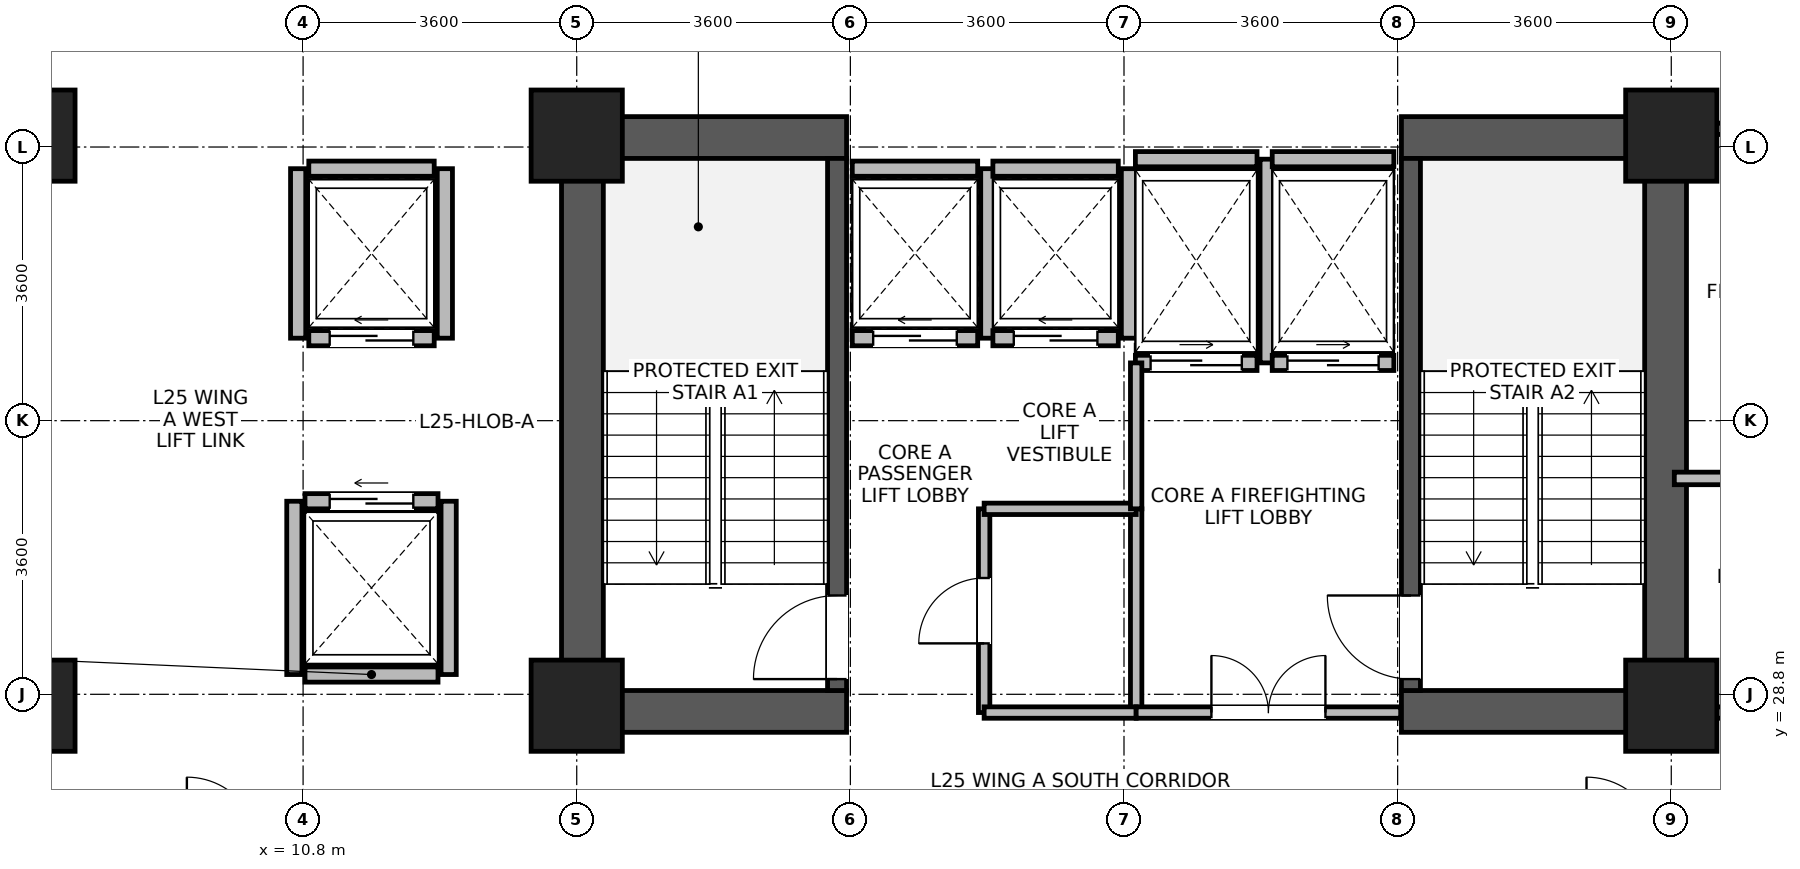
"""IFC4 building model, lengths in metres.
Left out: names, types, materials, properties, quantities, classifications, styles, units other than length and angle.
Written with IfcOpenShell. Run it as: python <this file> out.ifc"""

import sys

from ifc_helpers import new_model, si_unit, direction, frame, frame_2d, origin, origin_2d, place, context, subcontext, project, spatial, rectangle, extrude, source, transform, mapped, element, fill, save


model = new_model("IFC4")
c1 = context("Model", 3, precision=1e-05, world=origin(), true_north=direction((0.0, 1.0)))
c2 = subcontext(c1, "Body", "Model", "MODEL_VIEW")
j1 = project(units=[si_unit("LENGTHUNIT", "METRE"), si_unit("PLANEANGLEUNIT", "RADIAN")], contexts=[c1])
p1 = place(None, origin())
s1 = spatial("IfcSite", under=j1, at=p1, CompositionType="ELEMENT")
p2 = place(p1, origin())
s2 = spatial("IfcBuilding", under=s1, at=p2, CompositionType="ELEMENT")
p3 = place(p2, frame((0.0, 0.0, 100.8)))
s3 = spatial("IfcBuildingStorey", under=s2, at=p3, CompositionType="ELEMENT", Elevation=100.8)
for number, where, z_axis, x_axis in (
    (1, (14.475, 28.3, 0.0), (0.0, 0.0, 1.0), (0.0, 1.0, 0.0)),
    (2, (28.725, 28.3, 0.0), (0.0, 0.0, 1.0), (0.0, 1.0, 0.0)),
):
    element("IfcWall", number, at=place(p3, frame(where, z_axis=z_axis, x_axis=x_axis)), inside=s3, PredefinedType="SHEAR", context=c2, shape_type="SweptSolid", body=[
        extrude(rectangle(XDim=8.1, YDim=0.55, at=frame_2d((4.05, 0.0))), origin(), (0.0, 0.0, 1.0), 3.45),
    ])
for number, where, z_axis, x_axis in (
    (3, (14.75, 28.575, 0.0), (0.0, 0.0, 1.0), (1.0, 0.0, 0.0)),
    (4, (25.25, 28.575, 0.0), (0.0, 0.0, 1.0), (1.0, 0.0, 0.0)),
    (5, (14.75, 36.125, 0.0), (0.0, 0.0, 1.0), (1.0, 0.0, 0.0)),
    (6, (25.25, 36.125, 0.0), (0.0, 0.0, 1.0), (1.0, 0.0, 0.0)),
):
    element("IfcWall", number, at=place(p3, frame(where, z_axis=z_axis, x_axis=x_axis)), inside=s3, PredefinedType="SHEAR", context=c2, shape_type="SweptSolid", body=[
        extrude(rectangle(XDim=3.2, YDim=0.55, at=frame_2d((1.6, 0.0))), origin(), (0.0, 0.0, 1.0), 3.45),
    ])
p4 = place(p3, frame((17.825, 28.85, 0.0), z_axis=(0.0, 0.0, 1.0), x_axis=(0.0, 1.0, 0.0)))
e7 = element("IfcWall", 7, at=p4, inside=s3, PredefinedType="SHEAR", context=c2, shape_type="SweptSolid", body=[
    extrude(rectangle(XDim=7.0, YDim=0.25, at=frame_2d((3.5, 0.0))), origin(), (0.0, 0.0, 1.0), 3.45),
])
p5 = place(p4, frame((0.15, 0.0, 0.0)))
e8 = element("IfcOpeningElement", 8, at=p5, cuts=e7, PredefinedType="OPENING", context=c2, shape_type="SweptSolid", body=[
    extrude(rectangle(XDim=1.1, YDim=2.08, at=frame_2d((0.55, 1.04))), frame((0.0, 0.135, 0.0), z_axis=(0.0, -1.0, 0.0), x_axis=(1.0, 0.0, 0.0)), (0.0, 0.0, 1.0), 0.27),
])
p6 = place(p3, frame((25.375, 28.85, 0.0), z_axis=(0.0, 0.0, 1.0), x_axis=(0.0, 1.0, 0.0)))
e9 = element("IfcWall", 9, at=p6, inside=s3, PredefinedType="SHEAR", context=c2, shape_type="SweptSolid", body=[
    extrude(rectangle(XDim=7.0, YDim=0.25, at=frame_2d((3.5, 0.0))), origin(), (0.0, 0.0, 1.0), 3.45),
])
p7 = place(p6, frame((0.15, 0.0, 0.0)))
e10 = element("IfcOpeningElement", 10, at=p7, cuts=e9, PredefinedType="OPENING", context=c2, shape_type="SweptSolid", body=[
    extrude(rectangle(XDim=1.1, YDim=2.08, at=frame_2d((0.55, 1.04))), frame((0.0, 0.135, 0.0), z_axis=(0.0, -1.0, 0.0), x_axis=(1.0, 0.0, 0.0)), (0.0, 0.0, 1.0), 0.27),
])
m1 = source(origin(), c2, "Body", "SweptSolid", [
    extrude(rectangle(XDim=1.2, YDim=1.2, at=origin_2d()), origin(), (0.0, 0.0, 1.0), 3.7),
])
for number, where, z_axis, x_axis in (
    (11, (7.2, 28.65, 0.0), (0.0, 0.0, 1.0), (1.0, 0.0, 0.0)),
    (12, (7.2, 36.15, 0.0), (0.0, 0.0, 1.0), (1.0, 0.0, 0.0)),
    (13, (14.4, 28.65, 0.0), (0.0, 0.0, 1.0), (1.0, 0.0, 0.0)),
    (14, (14.4, 36.15, 0.0), (0.0, 0.0, 1.0), (1.0, 0.0, 0.0)),
    (15, (28.8, 28.65, 0.0), (0.0, 0.0, 1.0), (1.0, 0.0, 0.0)),
    (16, (28.8, 36.15, 0.0), (0.0, 0.0, 1.0), (1.0, 0.0, 0.0)),
):
    element("IfcColumn", number, at=place(p3, frame(where, z_axis=z_axis, x_axis=x_axis)), inside=s3, PredefinedType="COLUMN", context=c2, shape_type="MappedRepresentation", body=[
        mapped(m1, transform((0.0, 0.0, 0.0), x_axis=(1.0, 0.0, 0.0), y_axis=(0.0, 1.0, 0.0), z_axis=(0.0, 0.0, 1.0), scale=1.0)),
    ])
p8 = place(p3, frame((18.025, 33.485, 0.0), z_axis=(0.0, 0.0, 1.0), x_axis=(1.0, 0.0, 0.0)))
e17 = element("IfcWall", 17, at=p8, inside=s3, PredefinedType="PARTITIONING", context=c2, shape_type="SweptSolid", body=[
    extrude(rectangle(XDim=1.65, YDim=0.2, at=frame_2d((0.825, 0.0))), origin(), (0.0, 0.0, 1.0), 3.43),
])
p9 = place(p8, frame((0.275, 0.0, 0.0)))
e18 = element("IfcOpeningElement", 18, at=p9, cuts=e17, PredefinedType="OPENING", context=c2, shape_type="SweptSolid", body=[
    extrude(rectangle(XDim=1.1, YDim=2.12, at=frame_2d((0.55, 1.06))), frame((0.0, 0.11, 0.0), z_axis=(0.0, -1.0, 0.0), x_axis=(1.0, 0.0, 0.0)), (0.0, 0.0, 1.0), 0.22),
])
p10 = place(p3, frame((18.025, 35.715, 0.0), z_axis=(0.0, 0.0, 1.0), x_axis=(1.0, 0.0, 0.0)))
e19 = element("IfcWall", 19, at=p10, inside=s3, PredefinedType="PARTITIONING", context=c2, shape_type="SweptSolid", body=[
    extrude(rectangle(XDim=1.65, YDim=0.2, at=frame_2d((0.825, 0.0))), origin(), (0.0, 0.0, 1.0), 3.43),
])
p11 = place(p3, frame((19.815, 33.485, 0.0), z_axis=(0.0, 0.0, 1.0), x_axis=(0.0, 1.0, 0.0)))
e20 = element("IfcWall", 20, at=p11, inside=s3, PredefinedType="PARTITIONING", context=c2, shape_type="SweptSolid", body=[
    extrude(rectangle(XDim=2.23, YDim=0.2, at=frame_2d((1.115, 0.0))), origin(), (0.0, 0.0, 1.0), 3.43),
])
p12 = place(p3, frame((19.875, 33.485, 0.0), z_axis=(0.0, 0.0, 1.0), x_axis=(1.0, 0.0, 0.0)))
e21 = element("IfcWall", 21, at=p12, inside=s3, PredefinedType="PARTITIONING", context=c2, shape_type="SweptSolid", body=[
    extrude(rectangle(XDim=1.65, YDim=0.2, at=frame_2d((0.825, 0.0))), origin(), (0.0, 0.0, 1.0), 3.43),
])
p13 = place(p12, frame((0.275, 0.0, 0.0)))
e22 = element("IfcOpeningElement", 22, at=p13, cuts=e21, PredefinedType="OPENING", context=c2, shape_type="SweptSolid", body=[
    extrude(rectangle(XDim=1.1, YDim=2.12, at=frame_2d((0.55, 1.06))), frame((0.0, 0.11, 0.0), z_axis=(0.0, -1.0, 0.0), x_axis=(1.0, 0.0, 0.0)), (0.0, 0.0, 1.0), 0.22),
])
p14 = place(p3, frame((19.875, 35.715, 0.0), z_axis=(0.0, 0.0, 1.0), x_axis=(1.0, 0.0, 0.0)))
e23 = element("IfcWall", 23, at=p14, inside=s3, PredefinedType="PARTITIONING", context=c2, shape_type="SweptSolid", body=[
    extrude(rectangle(XDim=1.65, YDim=0.2, at=frame_2d((0.825, 0.0))), origin(), (0.0, 0.0, 1.0), 3.43),
])
p15 = place(p3, frame((21.665, 33.485, 0.0), z_axis=(0.0, 0.0, 1.0), x_axis=(0.0, 1.0, 0.0)))
e24 = element("IfcWall", 24, at=p15, inside=s3, PredefinedType="PARTITIONING", context=c2, shape_type="SweptSolid", body=[
    extrude(rectangle(XDim=2.23, YDim=0.2, at=frame_2d((1.115, 0.0))), origin(), (0.0, 0.0, 1.0), 3.43),
])
p16 = place(p3, frame((10.825, 29.06, 0.0), z_axis=(0.0, 0.0, 1.0), x_axis=(1.0, 0.0, 0.0)))
e25 = element("IfcWall", 25, at=p16, inside=s3, PredefinedType="PARTITIONING", context=c2, shape_type="SweptSolid", body=[
    extrude(rectangle(XDim=1.75, YDim=0.2, at=frame_2d((0.875, 0.0))), origin(), (0.0, 0.0, 1.0), 3.43),
])
p17 = place(p3, frame((10.825, 31.34, 0.0), z_axis=(0.0, 0.0, 1.0), x_axis=(1.0, 0.0, 0.0)))
e26 = element("IfcWall", 26, at=p17, inside=s3, PredefinedType="PARTITIONING", context=c2, shape_type="SweptSolid", body=[
    extrude(rectangle(XDim=1.75, YDim=0.2, at=frame_2d((0.875, 0.0))), origin(), (0.0, 0.0, 1.0), 3.43),
])
p18 = place(p17, frame((0.325, 0.0, 0.0)))
e27 = element("IfcOpeningElement", 27, at=p18, cuts=e26, PredefinedType="OPENING", context=c2, shape_type="SweptSolid", body=[
    extrude(rectangle(XDim=1.1, YDim=2.12, at=frame_2d((0.55, 1.06))), frame((0.0, 0.11, 0.0), z_axis=(0.0, -1.0, 0.0), x_axis=(1.0, 0.0, 0.0)), (0.0, 0.0, 1.0), 0.22),
])
for number, where, z_axis, x_axis in (
    (28, (10.685, 29.06, 0.0), (0.0, 0.0, 1.0), (0.0, 1.0, 0.0)),
    (29, (12.715, 29.06, 0.0), (0.0, 0.0, 1.0), (0.0, 1.0, 0.0)),
):
    element("IfcWall", number, at=place(p3, frame(where, z_axis=z_axis, x_axis=x_axis)), inside=s3, PredefinedType="PARTITIONING", context=c2, shape_type="SweptSolid", body=[
        extrude(rectangle(XDim=2.28, YDim=0.2, at=frame_2d((1.14, 0.0))), origin(), (0.0, 0.0, 1.0), 3.43),
    ])
p19 = place(p3, frame((10.875, 33.485, 0.0), z_axis=(0.0, 0.0, 1.0), x_axis=(1.0, 0.0, 0.0)))
e30 = element("IfcWall", 30, at=p19, inside=s3, PredefinedType="PARTITIONING", context=c2, shape_type="SweptSolid", body=[
    extrude(rectangle(XDim=1.65, YDim=0.2, at=frame_2d((0.825, 0.0))), origin(), (0.0, 0.0, 1.0), 3.43),
])
p20 = place(p19, frame((0.275, 0.0, 0.0)))
e31 = element("IfcOpeningElement", 31, at=p20, cuts=e30, PredefinedType="OPENING", context=c2, shape_type="SweptSolid", body=[
    extrude(rectangle(XDim=1.1, YDim=2.12, at=frame_2d((0.55, 1.06))), frame((0.0, 0.11, 0.0), z_axis=(0.0, -1.0, 0.0), x_axis=(1.0, 0.0, 0.0)), (0.0, 0.0, 1.0), 0.22),
])
p21 = place(p3, frame((10.875, 35.715, 0.0), z_axis=(0.0, 0.0, 1.0), x_axis=(1.0, 0.0, 0.0)))
e32 = element("IfcWall", 32, at=p21, inside=s3, PredefinedType="PARTITIONING", context=c2, shape_type="SweptSolid", body=[
    extrude(rectangle(XDim=1.65, YDim=0.2, at=frame_2d((0.825, 0.0))), origin(), (0.0, 0.0, 1.0), 3.43),
])
for number, where, z_axis, x_axis in (
    (33, (10.735, 33.485, 0.0), (0.0, 0.0, 1.0), (0.0, 1.0, 0.0)),
    (34, (12.665, 33.485, 0.0), (0.0, 0.0, 1.0), (0.0, 1.0, 0.0)),
):
    element("IfcWall", number, at=place(p3, frame(where, z_axis=z_axis, x_axis=x_axis)), inside=s3, PredefinedType="PARTITIONING", context=c2, shape_type="SweptSolid", body=[
        extrude(rectangle(XDim=2.23, YDim=0.2, at=frame_2d((1.115, 0.0))), origin(), (0.0, 0.0, 1.0), 3.43),
    ])
p22 = place(p3, frame((21.75, 33.16, 0.0), z_axis=(0.0, 0.0, 1.0), x_axis=(1.0, 0.0, 0.0)))
e35 = element("IfcWall", 35, at=p22, inside=s3, PredefinedType="PARTITIONING", context=c2, shape_type="SweptSolid", body=[
    extrude(rectangle(XDim=1.6, YDim=0.2, at=frame_2d((0.8, 0.0))), origin(), (0.0, 0.0, 1.0), 3.43),
])
p23 = place(p22, frame((0.2, 0.0, 0.0)))
e36 = element("IfcOpeningElement", 36, at=p23, cuts=e35, PredefinedType="OPENING", context=c2, shape_type="SweptSolid", body=[
    extrude(rectangle(XDim=1.2, YDim=2.12, at=frame_2d((0.6, 1.06))), frame((0.0, 0.11, 0.0), z_axis=(0.0, -1.0, 0.0), x_axis=(1.0, 0.0, 0.0)), (0.0, 0.0, 1.0), 0.22),
])
p24 = place(p3, frame((21.75, 35.84, 0.0), z_axis=(0.0, 0.0, 1.0), x_axis=(1.0, 0.0, 0.0)))
e37 = element("IfcWall", 37, at=p24, inside=s3, PredefinedType="PARTITIONING", context=c2, shape_type="SweptSolid", body=[
    extrude(rectangle(XDim=1.6, YDim=0.2, at=frame_2d((0.8, 0.0))), origin(), (0.0, 0.0, 1.0), 2.43),
])
p25 = place(p3, frame((23.49, 33.16, 0.0), z_axis=(0.0, 0.0, 1.0), x_axis=(0.0, 1.0, 0.0)))
e38 = element("IfcWall", 38, at=p25, inside=s3, PredefinedType="PARTITIONING", context=c2, shape_type="SweptSolid", body=[
    extrude(rectangle(XDim=2.68, YDim=0.2, at=frame_2d((1.34, 0.0))), origin(), (0.0, 0.0, 1.0), 3.43),
])
p26 = place(p3, frame((23.55, 33.16, 0.0), z_axis=(0.0, 0.0, 1.0), x_axis=(1.0, 0.0, 0.0)))
e39 = element("IfcWall", 39, at=p26, inside=s3, PredefinedType="PARTITIONING", context=c2, shape_type="SweptSolid", body=[
    extrude(rectangle(XDim=1.6, YDim=0.2, at=frame_2d((0.8, 0.0))), origin(), (0.0, 0.0, 1.0), 3.43),
])
p27 = place(p26, frame((0.2, 0.0, 0.0)))
e40 = element("IfcOpeningElement", 40, at=p27, cuts=e39, PredefinedType="OPENING", context=c2, shape_type="SweptSolid", body=[
    extrude(rectangle(XDim=1.2, YDim=2.12, at=frame_2d((0.6, 1.06))), frame((0.0, 0.11, 0.0), z_axis=(0.0, -1.0, 0.0), x_axis=(1.0, 0.0, 0.0)), (0.0, 0.0, 1.0), 0.22),
])
p28 = place(p3, frame((23.55, 35.84, 0.0), z_axis=(0.0, 0.0, 1.0), x_axis=(1.0, 0.0, 0.0)))
e41 = element("IfcWall", 41, at=p28, inside=s3, PredefinedType="PARTITIONING", context=c2, shape_type="SweptSolid", body=[
    extrude(rectangle(XDim=1.6, YDim=0.2, at=frame_2d((0.8, 0.0))), origin(), (0.0, 0.0, 1.0), 2.43),
])
p29 = place(p3, frame((29.4, 28.56, 0.0), z_axis=(0.0, 0.0, 1.0), x_axis=(1.0, 0.0, 0.0)))
e42 = element("IfcWall", 42, at=p29, inside=s3, PredefinedType="PARTITIONING", context=c2, shape_type="SweptSolid", body=[
    extrude(rectangle(XDim=3.96, YDim=0.15, at=frame_2d((1.98, 0.0))), origin(), (0.0, 0.0, 1.0), 2.78),
])
p30 = place(p29, frame((1.55, 0.0, 0.0)))
e43 = element("IfcOpeningElement", 43, at=p30, cuts=e42, PredefinedType="OPENING", context=c2, shape_type="SweptSolid", body=[
    extrude(rectangle(XDim=0.86, YDim=2.02, at=frame_2d((0.43, 1.01))), frame((0.0, 0.085, 0.0), z_axis=(0.0, -1.0, 0.0), x_axis=(1.0, 0.0, 0.0)), (0.0, 0.0, 1.0), 0.17),
])
p31 = place(p3, frame((29.4, 36.24, 0.0), z_axis=(0.0, 0.0, 1.0), x_axis=(1.0, 0.0, 0.0)))
e44 = element("IfcWall", 44, at=p31, inside=s3, PredefinedType="PARTITIONING", context=c2, shape_type="SweptSolid", body=[
    extrude(rectangle(XDim=3.96, YDim=0.15, at=frame_2d((1.98, 0.0))), origin(), (0.0, 0.0, 1.0), 2.78),
])
p32 = place(p3, frame((19.76, 28.56, 0.0), z_axis=(0.0, 0.0, 1.0), x_axis=(0.0, 1.0, 0.0)))
e45 = element("IfcWall", 45, at=p32, inside=s3, PredefinedType="PARTITIONING", context=c2, shape_type="SweptSolid", body=[
    extrude(rectangle(XDim=2.68, YDim=0.15, at=frame_2d((1.34, 0.0))), origin(), (0.0, 0.0, 1.0), 3.43),
])
p33 = place(p32, frame((0.91, 0.0, 0.0)))
e46 = element("IfcOpeningElement", 46, at=p33, cuts=e45, PredefinedType="OPENING", context=c2, shape_type="SweptSolid", body=[
    extrude(rectangle(XDim=0.86, YDim=2.02, at=frame_2d((0.43, 1.01))), frame((0.0, 0.085, 0.0), z_axis=(0.0, -1.0, 0.0), x_axis=(1.0, 0.0, 0.0)), (0.0, 0.0, 1.0), 0.17),
])
p34 = place(p3, frame((21.76, 28.56, 0.0), z_axis=(0.0, 0.0, 1.0), x_axis=(0.0, 1.0, 0.0)))
e47 = element("IfcWall", 47, at=p34, inside=s3, PredefinedType="PARTITIONING", context=c2, shape_type="SweptSolid", body=[
    extrude(rectangle(XDim=2.68, YDim=0.15, at=frame_2d((1.34, 0.0))), origin(), (0.0, 0.0, 1.0), 3.43),
])
p35 = place(p3, frame((19.76, 28.56, 0.0), z_axis=(0.0, 0.0, 1.0), x_axis=(1.0, 0.0, 0.0)))
e48 = element("IfcWall", 48, at=p35, inside=s3, PredefinedType="PARTITIONING", context=c2, shape_type="SweptSolid", body=[
    extrude(rectangle(XDim=2.0, YDim=0.15, at=frame_2d((1.0, 0.0))), origin(), (0.0, 0.0, 1.0), 2.43),
])
p36 = place(p3, frame((19.76, 31.24, 0.0), z_axis=(0.0, 0.0, 1.0), x_axis=(1.0, 0.0, 0.0)))
e49 = element("IfcWall", 49, at=p36, inside=s3, PredefinedType="PARTITIONING", context=c2, shape_type="SweptSolid", body=[
    extrude(rectangle(XDim=2.0, YDim=0.15, at=frame_2d((1.0, 0.0))), origin(), (0.0, 0.0, 1.0), 3.43),
])
p37 = place(p3, frame((28.84, 31.64, 0.0), z_axis=(0.0, 0.0, 1.0), x_axis=(1.0, 0.0, 0.0)))
e50 = element("IfcWall", 50, at=p37, inside=s3, PredefinedType="PARTITIONING", context=c2, shape_type="SweptSolid", body=[
    extrude(rectangle(XDim=4.52, YDim=0.165, at=frame_2d((2.26, 0.0))), origin(), (0.0, 0.0, 1.0), 3.43),
])
p38 = place(p3, frame((21.76, 28.56, 0.0), z_axis=(0.0, 0.0, 1.0), x_axis=(1.0, 0.0, 0.0)))
e51 = element("IfcWall", 51, at=p38, inside=s3, PredefinedType="PARTITIONING", context=c2, shape_type="SweptSolid", body=[
    extrude(rectangle(XDim=3.48, YDim=0.15, at=frame_2d((1.74, 0.0))), origin(), (0.0, 0.0, 1.0), 2.43),
])
p39 = place(p38, frame((0.99, 0.0, 0.0)))
e52 = element("IfcOpeningElement", 52, at=p39, cuts=e51, PredefinedType="OPENING", context=c2, shape_type="SweptSolid", body=[
    extrude(rectangle(XDim=1.5, YDim=2.1, at=frame_2d((0.75, 1.05))), frame((0.0, 0.085, 0.0), z_axis=(0.0, -1.0, 0.0), x_axis=(1.0, 0.0, 0.0)), (0.0, 0.0, 1.0), 0.17),
])
p40 = place(p3, frame((21.76, 31.24, 0.0), z_axis=(0.0, 0.0, 1.0), x_axis=(0.0, 1.0, 0.0)))
e53 = element("IfcWall", 53, at=p40, inside=s3, PredefinedType="PARTITIONING", context=c2, shape_type="SweptSolid", body=[
    extrude(rectangle(XDim=1.92, YDim=0.15, at=frame_2d((0.96, 0.0))), origin(), (0.0, 0.0, 1.0), 3.43),
])
p41 = place(p5, origin())
e54 = element("IfcDoor", 54, at=p41, inside=s3, OperationType="SINGLE_SWING_LEFT", PredefinedType="DOOR", context=c2, shape_type="SweptSolid", body=[
    extrude(rectangle(XDim=1.1, YDim=2.08, at=frame_2d((0.55, 1.04))), frame((0.0, 0.025, 0.0), z_axis=(0.0, -1.0, 0.0), x_axis=(1.0, 0.0, 0.0)), (0.0, 0.0, 1.0), 0.05),
])
fill(e8, e54)
p42 = place(p7, origin())
e55 = element("IfcDoor", 55, at=p42, inside=s3, OperationType="SINGLE_SWING_RIGHT", PredefinedType="DOOR", context=c2, shape_type="SweptSolid", body=[
    extrude(rectangle(XDim=1.1, YDim=2.08, at=frame_2d((0.55, 1.04))), frame((0.0, 0.025, 0.0), z_axis=(0.0, -1.0, 0.0), x_axis=(1.0, 0.0, 0.0)), (0.0, 0.0, 1.0), 0.05),
])
fill(e10, e55)
p43 = place(p9, origin())
e56 = element("IfcDoor", 56, at=p43, inside=s3, OperationType="SLIDING_TO_LEFT", PredefinedType="DOOR", context=c2, shape_type="SweptSolid", body=[
    extrude(rectangle(XDim=1.1, YDim=2.12, at=frame_2d((0.55, 1.06))), frame((0.0, 0.025, 0.0), z_axis=(0.0, -1.0, 0.0), x_axis=(1.0, 0.0, 0.0)), (0.0, 0.0, 1.0), 0.05),
])
fill(e18, e56)
p44 = place(p13, origin())
e57 = element("IfcDoor", 57, at=p44, inside=s3, OperationType="SLIDING_TO_LEFT", PredefinedType="DOOR", context=c2, shape_type="SweptSolid", body=[
    extrude(rectangle(XDim=1.1, YDim=2.12, at=frame_2d((0.55, 1.06))), frame((0.0, 0.025, 0.0), z_axis=(0.0, -1.0, 0.0), x_axis=(1.0, 0.0, 0.0)), (0.0, 0.0, 1.0), 0.05),
])
fill(e22, e57)
p45 = place(p18, origin())
e58 = element("IfcDoor", 58, at=p45, inside=s3, OperationType="SLIDING_TO_LEFT", PredefinedType="DOOR", context=c2, shape_type="SweptSolid", body=[
    extrude(rectangle(XDim=1.1, YDim=2.12, at=frame_2d((0.55, 1.06))), frame((0.0, 0.025, 0.0), z_axis=(0.0, -1.0, 0.0), x_axis=(1.0, 0.0, 0.0)), (0.0, 0.0, 1.0), 0.05),
])
fill(e27, e58)
p46 = place(p20, origin())
e59 = element("IfcDoor", 59, at=p46, inside=s3, OperationType="SLIDING_TO_LEFT", PredefinedType="DOOR", context=c2, shape_type="SweptSolid", body=[
    extrude(rectangle(XDim=1.1, YDim=2.12, at=frame_2d((0.55, 1.06))), frame((0.0, 0.025, 0.0), z_axis=(0.0, -1.0, 0.0), x_axis=(1.0, 0.0, 0.0)), (0.0, 0.0, 1.0), 0.05),
])
fill(e31, e59)
p47 = place(p23, origin())
e60 = element("IfcDoor", 60, at=p47, inside=s3, OperationType="SLIDING_TO_RIGHT", PredefinedType="DOOR", context=c2, shape_type="SweptSolid", body=[
    extrude(rectangle(XDim=1.2, YDim=2.12, at=frame_2d((0.6, 1.06))), frame((0.0, 0.025, 0.0), z_axis=(0.0, -1.0, 0.0), x_axis=(1.0, 0.0, 0.0)), (0.0, 0.0, 1.0), 0.05),
])
fill(e36, e60)
p48 = place(p27, origin())
e61 = element("IfcDoor", 61, at=p48, inside=s3, OperationType="SLIDING_TO_RIGHT", PredefinedType="DOOR", context=c2, shape_type="SweptSolid", body=[
    extrude(rectangle(XDim=1.2, YDim=2.12, at=frame_2d((0.6, 1.06))), frame((0.0, 0.025, 0.0), z_axis=(0.0, -1.0, 0.0), x_axis=(1.0, 0.0, 0.0)), (0.0, 0.0, 1.0), 0.05),
])
fill(e40, e61)
p49 = place(p33, origin())
e62 = element("IfcDoor", 62, at=p49, inside=s3, OperationType="SINGLE_SWING_LEFT", PredefinedType="DOOR", context=c2, shape_type="SweptSolid", body=[
    extrude(rectangle(XDim=0.86, YDim=2.02, at=frame_2d((0.43, 1.01))), frame((0.0, 0.025, 0.0), z_axis=(0.0, -1.0, 0.0), x_axis=(1.0, 0.0, 0.0)), (0.0, 0.0, 1.0), 0.05),
])
fill(e46, e62)
p50 = place(p39, origin())
e63 = element("IfcDoor", 63, at=p50, inside=s3, OperationType="DOUBLE_DOOR_SINGLE_SWING", PredefinedType="DOOR", context=c2, shape_type="SweptSolid", body=[
    extrude(rectangle(XDim=1.5, YDim=2.1, at=frame_2d((0.75, 1.05))), frame((0.0, 0.025, 0.0), z_axis=(0.0, -1.0, 0.0), x_axis=(1.0, 0.0, 0.0)), (0.0, 0.0, 1.0), 0.05),
])
fill(e52, e63)
save(model, sys.argv[1])
